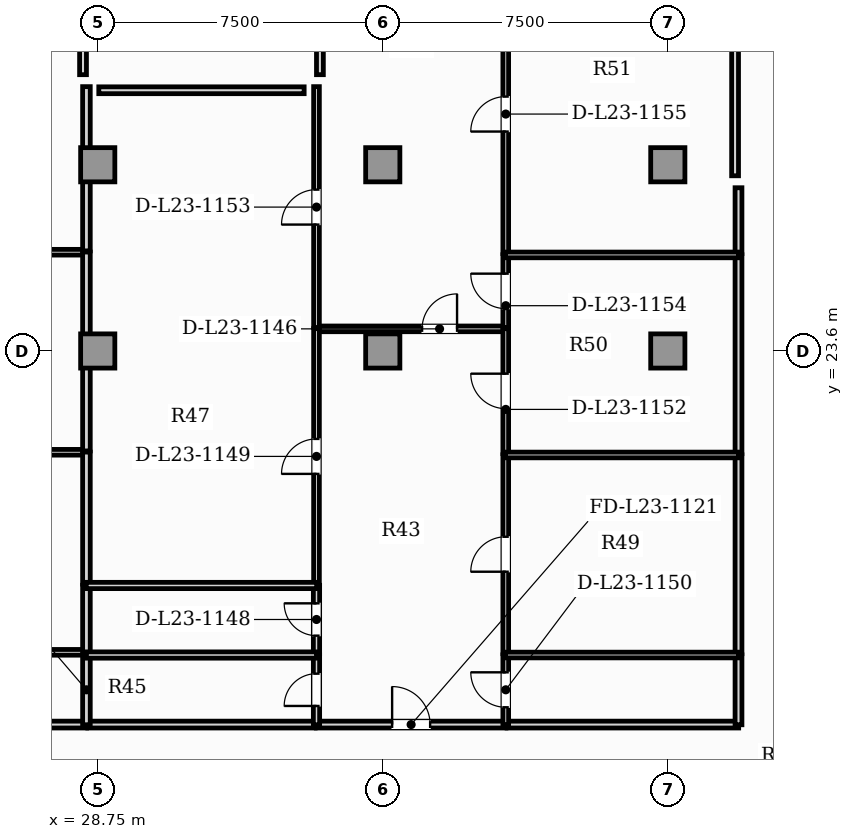
"""IFC4 building model, lengths in metres.
Left out: names, types, materials, properties, quantities, classifications, styles, units other than length and angle.
Written with IfcOpenShell. Run it as: python <this file> out.ifc"""

import sys

from ifc_helpers import new_model, si_unit, direction, frame, frame_2d, origin, origin_2d, place, context, subcontext, project, spatial, rectangle, extrude, element, fill, save


model = new_model("IFC4")
c1 = context("Model", 3, precision=1e-05, world=origin(), true_north=direction((0.0, 1.0)))
c2 = subcontext(c1, "Body", "Model", "MODEL_VIEW")
j1 = project(units=[si_unit("LENGTHUNIT", "METRE"), si_unit("PLANEANGLEUNIT", "RADIAN")], contexts=[c1])
p1 = place(None, origin())
s1 = spatial("IfcSite", under=j1, at=p1, CompositionType="ELEMENT")
p2 = place(p1, origin())
s2 = spatial("IfcBuilding", under=s1, at=p2, CompositionType="ELEMENT")
p3 = place(p2, frame((0.0, 0.0, 96.45)))
s3 = spatial("IfcBuildingStorey", under=s2, at=p3, CompositionType="ELEMENT", Elevation=96.45)
for number, where, z_axis, x_axis in (
    (1, (28.75, 23.6, 0.0), (0.0, 0.0, 1.0), (1.0, 0.0, 0.0)),
    (2, (36.25, 23.6, 0.0), (0.0, 0.0, 1.0), (1.0, 0.0, 0.0)),
    (3, (43.75, 23.6, 0.0), (0.0, 0.0, 1.0), (1.0, 0.0, 0.0)),
    (4, (28.75, 28.5, 0.0), (0.0, 0.0, 1.0), (1.0, 0.0, 0.0)),
    (5, (36.25, 28.5, 0.0), (0.0, 0.0, 1.0), (1.0, 0.0, 0.0)),
    (6, (43.75, 28.5, 0.0), (0.0, 0.0, 1.0), (1.0, 0.0, 0.0)),
):
    element("IfcColumn", number, at=place(p3, frame(where, z_axis=z_axis, x_axis=x_axis)), inside=s3, PredefinedType="COLUMN", context=c2, shape_type="SweptSolid", body=[
        extrude(rectangle(XDim=0.9, YDim=0.9, at=origin_2d()), origin(), (0.0, 0.0, 1.0), 3.85),
    ])
p4 = place(p3, frame((22.73, 13.77, 0.0), z_axis=(0.0, 0.0, 1.0), x_axis=(1.0, 0.0, 0.0)))
e7 = element("IfcWall", 7, at=p4, inside=s3, PredefinedType="PARTITIONING", context=c2, shape_type="SweptSolid", body=[
    extrude(rectangle(XDim=5.728, YDim=0.18, at=frame_2d((2.864, 0.0))), origin(), (0.0, 0.0, 1.0), 3.6),
])
p5 = place(p3, frame((34.501, 13.77, 0.0), z_axis=(0.0, 0.0, 1.0), x_axis=(1.0, 0.0, 0.0)))
e8 = element("IfcWall", 8, at=p5, inside=s3, PredefinedType="PARTITIONING", context=c2, shape_type="SweptSolid", body=[
    extrude(rectangle(XDim=4.99, YDim=0.18, at=frame_2d((2.495, 0.0))), origin(), (0.0, 0.0, 1.0), 3.6),
])
p6 = place(p5, frame((1.995, 0.0, 0.0)))
e9 = element("IfcOpeningElement", 9, at=p6, cuts=e8, PredefinedType="OPENING", context=c2, shape_type="SweptSolid", body=[
    extrude(rectangle(XDim=1.0, YDim=2.15, at=frame_2d((0.5, 1.075))), frame((0.0, 0.1, 0.0), z_axis=(0.0, -1.0, 0.0), x_axis=(1.0, 0.0, 0.0)), (0.0, 0.0, 1.0), 0.2),
])
p7 = place(p3, frame((28.488, 13.77, 0.0), z_axis=(0.0, 0.0, 1.0), x_axis=(1.0, 0.0, 0.0)))
e10 = element("IfcWall", 10, at=p7, inside=s3, PredefinedType="PARTITIONING", context=c2, shape_type="SweptSolid", body=[
    extrude(rectangle(XDim=5.983, YDim=0.18, at=frame_2d((2.992, 0.0))), origin(), (0.0, 0.0, 1.0), 3.6),
])
p8 = place(p3, frame((39.521, 13.77, 0.0), z_axis=(0.0, 0.0, 1.0), x_axis=(1.0, 0.0, 0.0)))
e11 = element("IfcWall", 11, at=p8, inside=s3, PredefinedType="PARTITIONING", context=c2, shape_type="SweptSolid", body=[
    extrude(rectangle(XDim=6.094, YDim=0.18, at=frame_2d((3.047, 0.0))), origin(), (0.0, 0.0, 1.0), 3.6),
])
p9 = place(p3, frame((45.61, 13.765, 0.0), z_axis=(0.0, 0.0, 1.0), x_axis=(0.0, 1.0, 0.0)))
e12 = element("IfcWall", 12, at=p9, inside=s3, PredefinedType="PARTITIONING", context=c2, shape_type="SweptSolid", body=[
    extrude(rectangle(XDim=1.84, YDim=0.18, at=frame_2d((0.92, 0.0))), origin(), (0.0, 0.0, 1.0), 3.6),
])
for number, where, z_axis, x_axis in (
    (13, (45.61, 15.635, 0.0), (0.0, 0.0, 1.0), (0.0, 1.0, 0.0)),
    (14, (45.61, 20.899, 0.0), (0.0, 0.0, 1.0), (0.0, 1.0, 0.0)),
):
    element("IfcWall", number, at=place(p3, frame(where, z_axis=z_axis, x_axis=x_axis)), inside=s3, PredefinedType="PARTITIONING", context=c2, shape_type="SweptSolid", body=[
        extrude(rectangle(XDim=5.234, YDim=0.18, at=frame_2d((2.617, 0.0))), origin(), (0.0, 0.0, 1.0), 3.6),
    ])
p10 = place(p3, frame((45.61, 26.162, 0.0), z_axis=(0.0, 0.0, 1.0), x_axis=(0.0, 1.0, 0.0)))
e15 = element("IfcWall", 15, at=p10, inside=s3, PredefinedType="PARTITIONING", context=c2, shape_type="SweptSolid", body=[
    extrude(rectangle(XDim=1.733, YDim=0.18, at=frame_2d((0.866, 0.0))), origin(), (0.0, 0.0, 1.0), 3.6),
])
p11 = place(p3, frame((22.69, 15.671, 0.0), z_axis=(0.0, 0.0, 1.0), x_axis=(1.0, 0.0, 0.0)))
e16 = element("IfcWall", 16, at=p11, inside=s3, PredefinedType="PARTITIONING", context=c2, shape_type="SweptSolid", body=[
    extrude(rectangle(XDim=5.768, YDim=0.15, at=frame_2d((2.884, 0.0))), origin(), (0.0, 0.0, 1.0), 3.6),
])
p12 = place(p3, frame((28.453, 13.765, 0.0), z_axis=(0.0, 0.0, 1.0), x_axis=(0.0, 1.0, 0.0)))
e17 = element("IfcWall", 17, at=p12, inside=s3, PredefinedType="PARTITIONING", context=c2, shape_type="SweptSolid", body=[
    extrude(rectangle(XDim=1.84, YDim=0.2, at=frame_2d((0.92, 0.0))), origin(), (0.0, 0.0, 1.0), 3.6),
])
p13 = place(p3, frame((22.69, 20.935, 0.0), z_axis=(0.0, 0.0, 1.0), x_axis=(1.0, 0.0, 0.0)))
e18 = element("IfcWall", 18, at=p13, inside=s3, PredefinedType="PARTITIONING", context=c2, shape_type="SweptSolid", body=[
    extrude(rectangle(XDim=5.768, YDim=0.15, at=frame_2d((2.884, 0.0))), origin(), (0.0, 0.0, 1.0), 3.6),
])
p14 = place(p3, frame((28.453, 15.666, 0.0), z_axis=(0.0, 0.0, 1.0), x_axis=(0.0, 1.0, 0.0)))
e19 = element("IfcWall", 19, at=p14, inside=s3, PredefinedType="PARTITIONING", context=c2, shape_type="SweptSolid", body=[
    extrude(rectangle(XDim=1.769, YDim=0.2, at=frame_2d((0.884, 0.0))), origin(), (0.0, 0.0, 1.0), 3.6),
])
p15 = place(p3, frame((28.453, 17.465, 0.0), z_axis=(0.0, 0.0, 1.0), x_axis=(0.0, 1.0, 0.0)))
e20 = element("IfcWall", 20, at=p15, inside=s3, PredefinedType="PARTITIONING", context=c2, shape_type="SweptSolid", body=[
    extrude(rectangle(XDim=3.475, YDim=0.2, at=frame_2d((1.737, 0.0))), origin(), (0.0, 0.0, 1.0), 3.6),
])
p16 = place(p3, frame((22.69, 26.198, 0.0), z_axis=(0.0, 0.0, 1.0), x_axis=(1.0, 0.0, 0.0)))
e21 = element("IfcWall", 21, at=p16, inside=s3, PredefinedType="PARTITIONING", context=c2, shape_type="SweptSolid", body=[
    extrude(rectangle(XDim=5.768, YDim=0.15, at=frame_2d((2.884, 0.0))), origin(), (0.0, 0.0, 1.0), 3.6),
])
p17 = place(p3, frame((28.453, 20.97, 0.0), z_axis=(0.0, 0.0, 1.0), x_axis=(0.0, 1.0, 0.0)))
e22 = element("IfcWall", 22, at=p17, inside=s3, PredefinedType="PARTITIONING", context=c2, shape_type="SweptSolid", body=[
    extrude(rectangle(XDim=5.234, YDim=0.2, at=frame_2d((2.617, 0.0))), origin(), (0.0, 0.0, 1.0), 3.6),
])
p18 = place(p3, frame((28.453, 26.234, 0.0), z_axis=(0.0, 0.0, 1.0), x_axis=(0.0, 1.0, 0.0)))
e23 = element("IfcWall", 23, at=p18, inside=s3, PredefinedType="PARTITIONING", context=c2, shape_type="SweptSolid", body=[
    extrude(rectangle(XDim=4.322, YDim=0.2, at=frame_2d((2.161, 0.0))), origin(), (0.0, 0.0, 1.0), 3.6),
])
p19 = place(p3, frame((34.501, 24.182, 0.0), z_axis=(0.0, 0.0, 1.0), x_axis=(1.0, 0.0, 0.0)))
e24 = element("IfcWall", 24, at=p19, inside=s3, PredefinedType="PARTITIONING", context=c2, shape_type="SweptSolid", body=[
    extrude(rectangle(XDim=4.99, YDim=0.15, at=frame_2d((2.495, 0.0))), origin(), (0.0, 0.0, 1.0), 3.6),
])
p20 = place(p19, frame((2.783, 0.0, 0.0)))
e25 = element("IfcOpeningElement", 25, at=p20, cuts=e24, PredefinedType="OPENING", context=c2, shape_type="SweptSolid", body=[
    extrude(rectangle(XDim=0.92, YDim=2.1, at=frame_2d((0.46, 1.05))), frame((0.0, 0.085, 0.0), z_axis=(0.0, -1.0, 0.0), x_axis=(1.0, 0.0, 0.0)), (0.0, 0.0, 1.0), 0.17),
])
p21 = place(p3, frame((34.506, 13.765, 0.0), z_axis=(0.0, 0.0, 1.0), x_axis=(0.0, 1.0, 0.0)))
e26 = element("IfcWall", 26, at=p21, inside=s3, PredefinedType="PLUMBINGWALL", context=c2, shape_type="SweptSolid", body=[
    extrude(rectangle(XDim=1.84, YDim=0.165, at=frame_2d((0.92, 0.0))), origin(), (0.0, 0.0, 1.0), 3.6),
])
p22 = place(p21, frame((0.495, 0.0, 0.0)))
e27 = element("IfcOpeningElement", 27, at=p22, cuts=e26, PredefinedType="OPENING", context=c2, shape_type="SweptSolid", body=[
    extrude(rectangle(XDim=0.85, YDim=2.1, at=frame_2d((0.425, 1.05))), frame((0.0, 0.093, 0.0), z_axis=(0.0, -1.0, 0.0), x_axis=(1.0, 0.0, 0.0)), (0.0, 0.0, 1.0), 0.185),
])
p23 = place(p3, frame((34.506, 15.635, 0.0), z_axis=(0.0, 0.0, 1.0), x_axis=(0.0, 1.0, 0.0)))
e28 = element("IfcWall", 28, at=p23, inside=s3, PredefinedType="PLUMBINGWALL", context=c2, shape_type="SweptSolid", body=[
    extrude(rectangle(XDim=1.8, YDim=0.165, at=frame_2d((0.9, 0.0))), origin(), (0.0, 0.0, 1.0), 3.6),
])
p24 = place(p23, frame((0.475, 0.0, 0.0)))
e29 = element("IfcOpeningElement", 29, at=p24, cuts=e28, PredefinedType="OPENING", context=c2, shape_type="SweptSolid", body=[
    extrude(rectangle(XDim=0.85, YDim=2.1, at=frame_2d((0.425, 1.05))), frame((0.0, 0.093, 0.0), z_axis=(0.0, -1.0, 0.0), x_axis=(1.0, 0.0, 0.0)), (0.0, 0.0, 1.0), 0.185),
])
p25 = place(p3, frame((34.506, 17.465, 0.0), z_axis=(0.0, 0.0, 1.0), x_axis=(0.0, 1.0, 0.0)))
e30 = element("IfcWall", 30, at=p25, inside=s3, PredefinedType="PARTITIONING", context=c2, shape_type="SweptSolid", body=[
    extrude(rectangle(XDim=6.722, YDim=0.15, at=frame_2d((3.361, 0.0))), origin(), (0.0, 0.0, 1.0), 3.6),
])
p26 = place(p25, frame((2.901, 0.0, 0.0)))
e31 = element("IfcOpeningElement", 31, at=p26, cuts=e30, PredefinedType="OPENING", context=c2, shape_type="SweptSolid", body=[
    extrude(rectangle(XDim=0.92, YDim=2.1, at=frame_2d((0.46, 1.05))), frame((0.0, 0.085, 0.0), z_axis=(0.0, -1.0, 0.0), x_axis=(1.0, 0.0, 0.0)), (0.0, 0.0, 1.0), 0.17),
])
p27 = place(p3, frame((39.486, 13.765, 0.0), z_axis=(0.0, 0.0, 1.0), x_axis=(0.0, 1.0, 0.0)))
e32 = element("IfcWall", 32, at=p27, inside=s3, PredefinedType="PARTITIONING", context=c2, shape_type="SweptSolid", body=[
    extrude(rectangle(XDim=1.84, YDim=0.15, at=frame_2d((0.92, 0.0))), origin(), (0.0, 0.0, 1.0), 3.6),
])
p28 = place(p27, frame((0.46, 0.0, 0.0)))
e33 = element("IfcOpeningElement", 33, at=p28, cuts=e32, PredefinedType="OPENING", context=c2, shape_type="SweptSolid", body=[
    extrude(rectangle(XDim=0.92, YDim=2.1, at=frame_2d((0.46, 1.05))), frame((0.0, 0.085, 0.0), z_axis=(0.0, -1.0, 0.0), x_axis=(1.0, 0.0, 0.0)), (0.0, 0.0, 1.0), 0.17),
])
p29 = place(p3, frame((39.486, 15.635, 0.0), z_axis=(0.0, 0.0, 1.0), x_axis=(0.0, 1.0, 0.0)))
e34 = element("IfcWall", 34, at=p29, inside=s3, PredefinedType="PARTITIONING", context=c2, shape_type="SweptSolid", body=[
    extrude(rectangle(XDim=5.234, YDim=0.15, at=frame_2d((2.617, 0.0))), origin(), (0.0, 0.0, 1.0), 3.6),
])
p30 = place(p29, frame((2.157, 0.0, 0.0)))
e35 = element("IfcOpeningElement", 35, at=p30, cuts=e34, PredefinedType="OPENING", context=c2, shape_type="SweptSolid", body=[
    extrude(rectangle(XDim=0.92, YDim=2.1, at=frame_2d((0.46, 1.05))), frame((0.0, 0.085, 0.0), z_axis=(0.0, -1.0, 0.0), x_axis=(1.0, 0.0, 0.0)), (0.0, 0.0, 1.0), 0.17),
])
p31 = place(p3, frame((39.486, 20.899, 0.0), z_axis=(0.0, 0.0, 1.0), x_axis=(0.0, 1.0, 0.0)))
e36 = element("IfcWall", 36, at=p31, inside=s3, PredefinedType="PARTITIONING", context=c2, shape_type="SweptSolid", body=[
    extrude(rectangle(XDim=3.288, YDim=0.15, at=frame_2d((1.644, 0.0))), origin(), (0.0, 0.0, 1.0), 3.6),
])
p32 = place(p31, frame((1.184, 0.0, 0.0)))
e37 = element("IfcOpeningElement", 37, at=p32, cuts=e36, PredefinedType="OPENING", context=c2, shape_type="SweptSolid", body=[
    extrude(rectangle(XDim=0.92, YDim=2.1, at=frame_2d((0.46, 1.05))), frame((0.0, 0.085, 0.0), z_axis=(0.0, -1.0, 0.0), x_axis=(1.0, 0.0, 0.0)), (0.0, 0.0, 1.0), 0.17),
])
p33 = place(p3, frame((34.506, 24.217, 0.0), z_axis=(0.0, 0.0, 1.0), x_axis=(0.0, 1.0, 0.0)))
e38 = element("IfcWall", 38, at=p33, inside=s3, PredefinedType="PARTITIONING", context=c2, shape_type="SweptSolid", body=[
    extrude(rectangle(XDim=6.338, YDim=0.15, at=frame_2d((3.169, 0.0))), origin(), (0.0, 0.0, 1.0), 3.6),
])
p34 = place(p33, frame((2.709, 0.0, 0.0)))
e39 = element("IfcOpeningElement", 39, at=p34, cuts=e38, PredefinedType="OPENING", context=c2, shape_type="SweptSolid", body=[
    extrude(rectangle(XDim=0.92, YDim=2.1, at=frame_2d((0.46, 1.05))), frame((0.0, 0.085, 0.0), z_axis=(0.0, -1.0, 0.0), x_axis=(1.0, 0.0, 0.0)), (0.0, 0.0, 1.0), 0.17),
])
p35 = place(p3, frame((39.486, 24.217, 0.0), z_axis=(0.0, 0.0, 1.0), x_axis=(0.0, 1.0, 0.0)))
e40 = element("IfcWall", 40, at=p35, inside=s3, PredefinedType="PARTITIONING", context=c2, shape_type="SweptSolid", body=[
    extrude(rectangle(XDim=1.915, YDim=0.15, at=frame_2d((0.958, 0.0))), origin(), (0.0, 0.0, 1.0), 3.6),
])
p36 = place(p35, frame((0.498, 0.0, 0.0)))
e41 = element("IfcOpeningElement", 41, at=p36, cuts=e40, PredefinedType="OPENING", context=c2, shape_type="SweptSolid", body=[
    extrude(rectangle(XDim=0.92, YDim=2.1, at=frame_2d((0.46, 1.05))), frame((0.0, 0.085, 0.0), z_axis=(0.0, -1.0, 0.0), x_axis=(1.0, 0.0, 0.0)), (0.0, 0.0, 1.0), 0.17),
])
p37 = place(p3, frame((39.486, 26.162, 0.0), z_axis=(0.0, 0.0, 1.0), x_axis=(0.0, 1.0, 0.0)))
e42 = element("IfcWall", 42, at=p37, inside=s3, PredefinedType="PARTITIONING", context=c2, shape_type="SweptSolid", body=[
    extrude(rectangle(XDim=7.343, YDim=0.15, at=frame_2d((3.671, 0.0))), origin(), (0.0, 0.0, 1.0), 3.6),
])
p38 = place(p37, frame((3.211, 0.0, 0.0)))
e43 = element("IfcOpeningElement", 43, at=p38, cuts=e42, PredefinedType="OPENING", context=c2, shape_type="SweptSolid", body=[
    extrude(rectangle(XDim=0.92, YDim=2.1, at=frame_2d((0.46, 1.05))), frame((0.0, 0.085, 0.0), z_axis=(0.0, -1.0, 0.0), x_axis=(1.0, 0.0, 0.0)), (0.0, 0.0, 1.0), 0.17),
])
for number, where, z_axis, x_axis in (
    (44, (28.448, 15.6, 0.0), (0.0, 0.0, 1.0), (1.0, 0.0, 0.0)),
    (45, (28.448, 17.43, 0.0), (0.0, 0.0, 1.0), (1.0, 0.0, 0.0)),
):
    element("IfcWall", number, at=place(p3, frame(where, z_axis=z_axis, x_axis=x_axis)), inside=s3, PredefinedType="PLUMBINGWALL", context=c2, shape_type="SweptSolid", body=[
        extrude(rectangle(XDim=6.063, YDim=0.165, at=frame_2d((3.031, 0.0))), origin(), (0.0, 0.0, 1.0), 3.6),
    ])
for number, where, z_axis, x_axis in (
    (46, (39.481, 15.6, 0.0), (0.0, 0.0, 1.0), (1.0, 0.0, 0.0)),
    (47, (39.481, 20.864, 0.0), (0.0, 0.0, 1.0), (1.0, 0.0, 0.0)),
    (48, (39.481, 26.127, 0.0), (0.0, 0.0, 1.0), (1.0, 0.0, 0.0)),
):
    element("IfcWall", number, at=place(p3, frame(where, z_axis=z_axis, x_axis=x_axis)), inside=s3, PredefinedType="PARTITIONING", context=c2, shape_type="SweptSolid", body=[
        extrude(rectangle(XDim=6.134, YDim=0.15, at=frame_2d((3.067, 0.0))), origin(), (0.0, 0.0, 1.0), 3.6),
    ])
p39 = place(p3, frame((28.363, 33.175, 0.0), z_axis=(0.0, 0.0, 1.0), x_axis=(0.0, -1.0, 0.0)))
e49 = element("IfcWall", 49, at=p39, inside=s3, PredefinedType="PARTITIONING", context=c2, shape_type="SweptSolid", body=[
    extrude(rectangle(XDim=2.305, YDim=0.18, at=frame_2d((1.152, 0.0))), origin(), (0.0, 0.0, 1.0), 3.6),
])
p40 = place(p3, frame((34.596, 30.87, 0.0), z_axis=(0.0, 0.0, 1.0), x_axis=(0.0, 1.0, 0.0)))
e50 = element("IfcWall", 50, at=p40, inside=s3, PredefinedType="PARTITIONING", context=c2, shape_type="SweptSolid", body=[
    extrude(rectangle(XDim=2.815, YDim=0.18, at=frame_2d((1.407, 0.0))), origin(), (0.0, 0.0, 1.0), 3.6),
])
p41 = place(p3, frame((28.778, 30.46, 0.0), z_axis=(0.0, 0.0, 1.0), x_axis=(1.0, 0.0, 0.0)))
e51 = element("IfcWall", 51, at=p41, inside=s3, PredefinedType="PARTITIONING", context=c2, shape_type="SweptSolid", body=[
    extrude(rectangle(XDim=5.403, YDim=0.18, at=frame_2d((2.702, 0.0))), origin(), (0.0, 0.0, 1.0), 3.6),
])
p42 = place(p3, frame((45.52, 33.175, 0.0), z_axis=(0.0, 0.0, 1.0), x_axis=(0.0, -1.0, 0.0)))
e52 = element("IfcWall", 52, at=p42, inside=s3, PredefinedType="PARTITIONING", context=c2, shape_type="SweptSolid", body=[
    extrude(rectangle(XDim=4.965, YDim=0.18, at=frame_2d((2.482, 0.0))), origin(), (0.0, 0.0, 1.0), 3.6),
])
p43 = place(p6, origin())
e53 = element("IfcDoor", 53, at=p43, inside=s3, OperationType="SINGLE_SWING_LEFT", PredefinedType="DOOR", context=c2, shape_type="SweptSolid", body=[
    extrude(rectangle(XDim=1.0, YDim=2.15, at=frame_2d((0.5, 1.075))), frame((0.0, 0.025, 0.0), z_axis=(0.0, -1.0, 0.0), x_axis=(1.0, 0.0, 0.0)), (0.0, 0.0, 1.0), 0.05),
])
fill(e9, e53)
p44 = place(p20, origin())
e54 = element("IfcDoor", 54, at=p44, inside=s3, OperationType="SINGLE_SWING_RIGHT", PredefinedType="DOOR", context=c2, shape_type="SweptSolid", body=[
    extrude(rectangle(XDim=0.92, YDim=2.1, at=frame_2d((0.46, 1.05))), frame((0.0, 0.025, 0.0), z_axis=(0.0, -1.0, 0.0), x_axis=(1.0, 0.0, 0.0)), (0.0, 0.0, 1.0), 0.05),
])
fill(e25, e54)
p45 = place(p22, origin())
e55 = element("IfcDoor", 55, at=p45, inside=s3, OperationType="SINGLE_SWING_LEFT", PredefinedType="DOOR", context=c2, shape_type="SweptSolid", body=[
    extrude(rectangle(XDim=0.85, YDim=2.1, at=frame_2d((0.425, 1.05))), frame((0.0, 0.025, 0.0), z_axis=(0.0, -1.0, 0.0), x_axis=(1.0, 0.0, 0.0)), (0.0, 0.0, 1.0), 0.05),
])
fill(e27, e55)
p46 = place(p24, origin())
e56 = element("IfcDoor", 56, at=p46, inside=s3, OperationType="SINGLE_SWING_RIGHT", PredefinedType="DOOR", context=c2, shape_type="SweptSolid", body=[
    extrude(rectangle(XDim=0.85, YDim=2.1, at=frame_2d((0.425, 1.05))), frame((0.0, 0.025, 0.0), z_axis=(0.0, -1.0, 0.0), x_axis=(1.0, 0.0, 0.0)), (0.0, 0.0, 1.0), 0.05),
])
fill(e29, e56)
p47 = place(p26, origin())
e57 = element("IfcDoor", 57, at=p47, inside=s3, OperationType="SINGLE_SWING_LEFT", PredefinedType="DOOR", context=c2, shape_type="SweptSolid", body=[
    extrude(rectangle(XDim=0.92, YDim=2.1, at=frame_2d((0.46, 1.05))), frame((0.0, 0.025, 0.0), z_axis=(0.0, -1.0, 0.0), x_axis=(1.0, 0.0, 0.0)), (0.0, 0.0, 1.0), 0.05),
])
fill(e31, e57)
p48 = place(p28, origin())
e58 = element("IfcDoor", 58, at=p48, inside=s3, OperationType="SINGLE_SWING_RIGHT", PredefinedType="DOOR", context=c2, shape_type="SweptSolid", body=[
    extrude(rectangle(XDim=0.92, YDim=2.1, at=frame_2d((0.46, 1.05))), frame((0.0, 0.025, 0.0), z_axis=(0.0, -1.0, 0.0), x_axis=(1.0, 0.0, 0.0)), (0.0, 0.0, 1.0), 0.05),
])
fill(e33, e58)
p49 = place(p30, origin())
e59 = element("IfcDoor", 59, at=p49, inside=s3, OperationType="SINGLE_SWING_LEFT", PredefinedType="DOOR", context=c2, shape_type="SweptSolid", body=[
    extrude(rectangle(XDim=0.92, YDim=2.1, at=frame_2d((0.46, 1.05))), frame((0.0, 0.025, 0.0), z_axis=(0.0, -1.0, 0.0), x_axis=(1.0, 0.0, 0.0)), (0.0, 0.0, 1.0), 0.05),
])
fill(e35, e59)
p50 = place(p32, origin())
e60 = element("IfcDoor", 60, at=p50, inside=s3, OperationType="SINGLE_SWING_RIGHT", PredefinedType="DOOR", context=c2, shape_type="SweptSolid", body=[
    extrude(rectangle(XDim=0.92, YDim=2.1, at=frame_2d((0.46, 1.05))), frame((0.0, 0.025, 0.0), z_axis=(0.0, -1.0, 0.0), x_axis=(1.0, 0.0, 0.0)), (0.0, 0.0, 1.0), 0.05),
])
fill(e37, e60)
p51 = place(p34, origin())
e61 = element("IfcDoor", 61, at=p51, inside=s3, OperationType="SINGLE_SWING_LEFT", PredefinedType="DOOR", context=c2, shape_type="SweptSolid", body=[
    extrude(rectangle(XDim=0.92, YDim=2.1, at=frame_2d((0.46, 1.05))), frame((0.0, 0.025, 0.0), z_axis=(0.0, -1.0, 0.0), x_axis=(1.0, 0.0, 0.0)), (0.0, 0.0, 1.0), 0.05),
])
fill(e39, e61)
p52 = place(p36, origin())
e62 = element("IfcDoor", 62, at=p52, inside=s3, OperationType="SINGLE_SWING_RIGHT", PredefinedType="DOOR", context=c2, shape_type="SweptSolid", body=[
    extrude(rectangle(XDim=0.92, YDim=2.1, at=frame_2d((0.46, 1.05))), frame((0.0, 0.025, 0.0), z_axis=(0.0, -1.0, 0.0), x_axis=(1.0, 0.0, 0.0)), (0.0, 0.0, 1.0), 0.05),
])
fill(e41, e62)
p53 = place(p38, origin())
e63 = element("IfcDoor", 63, at=p53, inside=s3, OperationType="SINGLE_SWING_LEFT", PredefinedType="DOOR", context=c2, shape_type="SweptSolid", body=[
    extrude(rectangle(XDim=0.92, YDim=2.1, at=frame_2d((0.46, 1.05))), frame((0.0, 0.025, 0.0), z_axis=(0.0, -1.0, 0.0), x_axis=(1.0, 0.0, 0.0)), (0.0, 0.0, 1.0), 0.05),
])
fill(e43, e63)
save(model, sys.argv[1])
